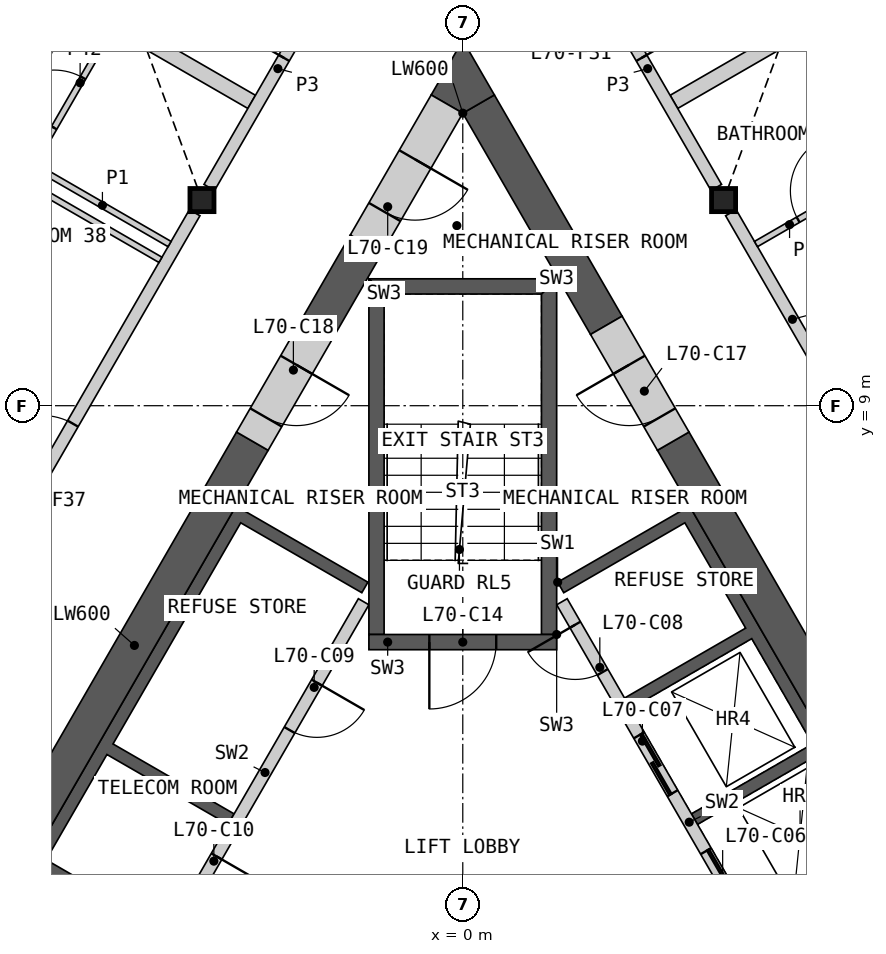
"""IFC4 building model, lengths in metres.
Left out: names, types, materials, properties, quantities, classifications, styles, units other than length and angle.
Written with IfcOpenShell. Run it as: python <this file> out.ifc"""

import sys

from ifc_helpers import new_model, si_unit, direction, frame, frame_2d, origin, origin_2d, place, context, subcontext, project, spatial, polyline, rectangle, i_section, outline, extrude, element, fill, save


model = new_model("IFC4")
c1 = context("Model", 3, precision=1e-05, world=origin(), true_north=direction((0.0, 1.0)))
c2 = subcontext(c1, "Body", "Model", "MODEL_VIEW")
j1 = project(units=[si_unit("LENGTHUNIT", "METRE"), si_unit("PLANEANGLEUNIT", "RADIAN")], contexts=[c1])
p1 = place(None, origin())
s1 = spatial("IfcSite", under=j1, at=p1, CompositionType="ELEMENT")
p2 = place(p1, origin())
s2 = spatial("IfcBuilding", under=s1, at=p2, CompositionType="ELEMENT")
p3 = place(p2, frame((0.0, 0.0, 318.8)))
s3 = spatial("IfcBuildingStorey", under=s2, at=p3, CompositionType="ELEMENT", Elevation=318.8)
for number, where, z_axis, x_axis in (
    (1, (-4.289, 12.382, 0.0), (0.0, 0.0, 1.0), (1.0, 0.0, 0.0)),
    (2, (4.289, 12.382, 0.0), (0.0, 0.0, 1.0), (1.0, 0.0, 0.0)),
):
    element("IfcColumn", number, at=place(p3, frame(where, z_axis=z_axis, x_axis=x_axis)), inside=s3, PredefinedType="COLUMN", context=c2, shape_type="SweptSolid", body=[
        extrude(i_section(OverallWidth=0.396, OverallDepth=0.381, WebThickness=0.019, FlangeThickness=0.03, at=origin_2d()), origin(), (0.0, 0.0, 1.0), 3.4),
    ])
p4 = place(p3, origin())
e3 = element("IfcWall", 3, at=p4, inside=s3, PredefinedType="SHEAR", context=c2, shape_type="SweptSolid", body=[
    extrude(outline(polyline([(1.561, 6.097), (3.731, 7.35), (8.231, -0.444), (6.061, -1.697), (5.96, -1.524), (7.952, -0.374), (6.952, 1.358), (4.96, 0.208), (4.861, 0.381), (6.852, 1.531), (5.852, 3.263), (3.861, 2.113), (3.76, 2.287), (5.752, 3.437), (4.752, 5.169), (2.76, 4.019), (2.66, 4.192), (4.652, 5.342), (3.652, 7.074), (1.66, 5.924), (1.561, 6.097)])), origin(), (0.0, 0.0, 1.0), 3.1),
])
p5 = place(p3, frame((5.817, -1.476, 0.0), z_axis=(0.0, 0.0, 1.0), x_axis=(-0.500002616675, 0.866023893041, 0.0)))
e4 = element("IfcWall", 4, at=p5, inside=s3, PredefinedType="SOLIDWALL", context=c2, shape_type="SweptSolid", body=[
    extrude(rectangle(XDim=8.373, YDim=0.2, at=frame_2d((4.187, 0.0))), origin(), (0.0, 0.0, 1.0), 3.1),
])
p6 = place(p5, frame((0.337, 0.0, 0.0)))
e5 = element("IfcOpeningElement", 5, at=p6, cuts=e4, PredefinedType="OPENING", context=c2, shape_type="SweptSolid", body=[
    extrude(rectangle(XDim=1.1, YDim=2.1, at=frame_2d((0.55, 1.05))), frame((0.0, 0.11, 0.0), z_axis=(0.0, -1.0, 0.0), x_axis=(1.0, 0.0, 0.0)), (0.0, 0.0, 1.0), 0.22),
])
p7 = place(p5, frame((2.537, 0.0, 0.0)))
e6 = element("IfcOpeningElement", 6, at=p7, cuts=e4, PredefinedType="OPENING", context=c2, shape_type="SweptSolid", body=[
    extrude(rectangle(XDim=1.1, YDim=2.1, at=frame_2d((0.55, 1.05))), frame((0.0, 0.11, 0.0), z_axis=(0.0, -1.0, 0.0), x_axis=(1.0, 0.0, 0.0)), (0.0, 0.0, 1.0), 0.22),
])
p8 = place(p5, frame((4.737, 0.0, 0.0)))
e7 = element("IfcOpeningElement", 7, at=p8, cuts=e4, PredefinedType="OPENING", context=c2, shape_type="SweptSolid", body=[
    extrude(rectangle(XDim=1.1, YDim=2.1, at=frame_2d((0.55, 1.05))), frame((0.0, 0.11, 0.0), z_axis=(0.0, -1.0, 0.0), x_axis=(1.0, 0.0, 0.0)), (0.0, 0.0, 1.0), 0.22),
])
p9 = place(p5, frame((7.037, 0.0, 0.0)))
e8 = element("IfcOpeningElement", 8, at=p9, cuts=e4, PredefinedType="OPENING", context=c2, shape_type="SweptSolid", body=[
    extrude(rectangle(XDim=0.9, YDim=2.1, at=frame_2d((0.45, 1.05))), frame((0.0, 0.11, 0.0), z_axis=(0.0, -1.0, 0.0), x_axis=(1.0, 0.0, 0.0)), (0.0, 0.0, 1.0), 0.22),
])
p10 = place(p3, origin())
e9 = element("IfcWall", 9, at=p10, inside=s3, PredefinedType="SHEAR", context=c2, shape_type="SweptSolid", body=[
    extrude(outline(polyline([(-4.96, 0.208), (-7.131, 1.461), (-3.731, 7.35), (-1.561, 6.097), (-1.66, 5.924), (-3.652, 7.074), (-5.752, 3.437), (-3.76, 2.287), (-3.861, 2.113), (-5.852, 3.263), (-6.852, 1.531), (-4.861, 0.381), (-4.96, 0.208)])), origin(), (0.0, 0.0, 1.0), 3.1),
])
p11 = place(p3, frame((-1.631, 5.776, 0.0), z_axis=(0.0, 0.0, 1.0), x_axis=(-0.499992876559, -0.866029516466, 0.0)))
e10 = element("IfcWall", 10, at=p11, inside=s3, PredefinedType="SOLIDWALL", context=c2, shape_type="SweptSolid", body=[
    extrude(rectangle(XDim=6.486, YDim=0.2, at=frame_2d((3.243, 0.0))), origin(), (0.0, 0.0, 1.0), 3.1),
])
p12 = place(p11, frame((1.537, 0.0, 0.0)))
e11 = element("IfcOpeningElement", 11, at=p12, cuts=e10, PredefinedType="OPENING", context=c2, shape_type="SweptSolid", body=[
    extrude(rectangle(XDim=0.9, YDim=2.1, at=frame_2d((0.45, 1.05))), frame((0.0, 0.11, 0.0), z_axis=(0.0, -1.0, 0.0), x_axis=(1.0, 0.0, 0.0)), (0.0, 0.0, 1.0), 0.22),
])
p13 = place(p11, frame((4.837, 0.0, 0.0)))
e12 = element("IfcOpeningElement", 12, at=p13, cuts=e10, PredefinedType="OPENING", context=c2, shape_type="SweptSolid", body=[
    extrude(rectangle(XDim=0.9, YDim=2.1, at=frame_2d((0.45, 1.05))), frame((0.0, 0.11, 0.0), z_axis=(0.0, -1.0, 0.0), x_axis=(1.0, 0.0, 0.0)), (0.0, 0.0, 1.0), 0.22),
])
p14 = place(p3, origin())
e13 = element("IfcWall", 13, at=p14, inside=s3, PredefinedType="SHEAR", context=c2, shape_type="SweptSolid", body=[
    extrude(outline(polyline([(1.544, 5.237), (1.544, 11.087), (1.294, 10.837), (1.294, 5.237), (1.544, 5.237)])), origin(), (0.0, 0.0, 1.0), 3.1),
])
p15 = place(p3, origin())
e14 = element("IfcWall", 14, at=p15, inside=s3, PredefinedType="SHEAR", context=c2, shape_type="SweptSolid", body=[
    extrude(outline(polyline([(1.544, 11.087), (-1.544, 11.087), (-1.294, 10.837), (1.294, 10.837), (1.544, 11.087)])), origin(), (0.0, 0.0, 1.0), 3.1),
])
p16 = place(p3, origin())
e15 = element("IfcWall", 15, at=p16, inside=s3, PredefinedType="SHEAR", context=c2, shape_type="SweptSolid", body=[
    extrude(outline(polyline([(-1.294, 10.837), (-1.544, 11.087), (-1.544, 5.237), (-1.294, 5.237), (-1.294, 10.837)])), origin(), (0.0, 0.0, 1.0), 3.1),
])
p17 = place(p3, frame((1.544, 5.112, 0.0), z_axis=(0.0, 0.0, 1.0), x_axis=(-1.0, 0.0, 0.0)))
e16 = element("IfcWall", 16, at=p17, inside=s3, PredefinedType="SHEAR", context=c2, shape_type="SweptSolid", body=[
    extrude(rectangle(XDim=3.088, YDim=0.25, at=frame_2d((1.544, 0.0))), origin(), (0.0, 0.0, 1.0), 3.1),
])
p18 = place(p17, frame((0.994, 0.0, 0.0)))
e17 = element("IfcOpeningElement", 17, at=p18, cuts=e16, PredefinedType="OPENING", context=c2, shape_type="SweptSolid", body=[
    extrude(rectangle(XDim=1.1, YDim=2.1, at=frame_2d((0.55, 1.05))), frame((0.0, 0.135, 0.0), z_axis=(0.0, -1.0, 0.0), x_axis=(1.0, 0.0, 0.0)), (0.0, 0.0, 1.0), 0.27),
])
p19 = place(p3, frame((8.686, -0.634, 0.0), z_axis=(0.0, 0.0, 1.0), x_axis=(-0.50001836461, 0.866014800712, 0.0)))
e18 = element("IfcWall", 18, at=p19, inside=s3, PredefinedType="SHEAR", context=c2, shape_type="SweptSolid", body=[
    extrude(rectangle(XDim=10.451, YDim=0.6, at=frame_2d((5.225, 0.0))), origin(), (0.0, 0.0, 1.0), 3.1),
])
p20 = place(p3, frame((2.361, 10.322, 0.0), z_axis=(0.0, 0.0, 1.0), x_axis=(-0.500000735859, 0.866024978935, 0.0)))
e19 = element("IfcWall", 19, at=p20, inside=s3, PredefinedType="SHEAR", context=c2, shape_type="SweptSolid", body=[
    extrude(rectangle(XDim=4.202, YDim=0.6, at=frame_2d((2.101, 0.0))), origin(), (0.0, 0.0, 1.0), 3.1),
])
p21 = place(p3, frame((-3.461, 8.417, 0.0), z_axis=(0.0, 0.0, 1.0), x_axis=(-0.50000391502, -0.866023143435, 0.0)))
e20 = element("IfcWall", 20, at=p21, inside=s3, PredefinedType="SHEAR", context=c2, shape_type="SweptSolid", body=[
    extrude(rectangle(XDim=7.759, YDim=0.6, at=frame_2d((3.879, 0.0))), origin(), (0.0, 0.0, 1.0), 3.1),
])
p22 = place(p3, frame((-1.59, 11.658, 0.0), z_axis=(0.0, 0.0, 1.0), x_axis=(-0.500037594623, -0.866003697431, 0.0)))
e21 = element("IfcWall", 21, at=p22, inside=s3, PredefinedType="SHEAR", context=c2, shape_type="SweptSolid", body=[
    extrude(rectangle(XDim=1.542, YDim=0.6, at=frame_2d((0.771, 0.0))), origin(), (0.0, 0.0, 1.0), 3.1),
])
p23 = place(p3, origin())
e22 = element("IfcWall", 22, at=p23, inside=s3, PredefinedType="SHEAR", context=c2, shape_type="SweptSolid", body=[
    extrude(outline(polyline([(0.0, 13.811), (-0.52, 14.111), (0.0, 15.011), (0.52, 14.111), (0.0, 13.811)])), origin(), (0.0, 0.0, 1.0), 3.1),
])
p24 = place(p3, frame((3.461, 8.417, 0.0), z_axis=(0.0, 0.0, 1.0), x_axis=(-0.499946605688, 0.86605622881, 0.0)))
e23 = element("IfcWall", 23, at=p24, inside=s3, PredefinedType="SHEAR", context=c2, shape_type="SweptSolid", body=[
    extrude(rectangle(XDim=2.2, YDim=0.6, at=frame_2d((1.1, 0.0))), origin(), (0.0, 0.0, 1.0), 3.1),
])
p25 = place(p24, frame((0.45, 0.0, 0.0)))
e24 = element("IfcOpeningElement", 24, at=p25, cuts=e23, PredefinedType="OPENING", context=c2, shape_type="SweptSolid", body=[
    extrude(rectangle(XDim=1.0, YDim=2.1, at=frame_2d((0.5, 1.05))), frame((0.0, 0.31, 0.0), z_axis=(0.0, -1.0, 0.0), x_axis=(1.0, 0.0, 0.0)), (0.0, 0.0, 1.0), 0.62),
])
p26 = place(p3, frame((-2.361, 10.322, 0.0), z_axis=(0.0, 0.0, 1.0), x_axis=(-0.499946605688, -0.86605622881, 0.0)))
e25 = element("IfcWall", 25, at=p26, inside=s3, PredefinedType="SHEAR", context=c2, shape_type="SweptSolid", body=[
    extrude(rectangle(XDim=2.2, YDim=0.6, at=frame_2d((1.1, 0.0))), origin(), (0.0, 0.0, 1.0), 3.1),
])
p27 = place(p26, frame((0.75, 0.0, 0.0)))
e26 = element("IfcOpeningElement", 26, at=p27, cuts=e25, PredefinedType="OPENING", context=c2, shape_type="SweptSolid", body=[
    extrude(rectangle(XDim=1.0, YDim=2.1, at=frame_2d((0.5, 1.05))), frame((0.0, 0.31, 0.0), z_axis=(0.0, -1.0, 0.0), x_axis=(1.0, 0.0, 0.0)), (0.0, 0.0, 1.0), 0.62),
])
p28 = place(p3, frame((-0.26, 13.961, 0.0), z_axis=(0.0, 0.0, 1.0), x_axis=(-0.49997936161, -0.866037319036, 0.0)))
e27 = element("IfcWall", 27, at=p28, inside=s3, PredefinedType="SHEAR", context=c2, shape_type="SweptSolid", body=[
    extrude(rectangle(XDim=2.66, YDim=0.6, at=frame_2d((1.33, 0.0))), origin(), (0.0, 0.0, 1.0), 3.1),
])
p29 = place(p28, frame((1.05, 0.0, 0.0)))
e28 = element("IfcOpeningElement", 28, at=p29, cuts=e27, PredefinedType="OPENING", context=c2, shape_type="SweptSolid", body=[
    extrude(rectangle(XDim=1.0, YDim=2.1, at=frame_2d((0.5, 1.05))), frame((0.0, 0.31, 0.0), z_axis=(0.0, -1.0, 0.0), x_axis=(1.0, 0.0, 0.0)), (0.0, 0.0, 1.0), 0.62),
])
p30 = place(p3, frame((3.472, 13.997, 0.0), z_axis=(0.0, 0.0, 1.0), x_axis=(0.866029233976, 0.499993365855, 0.0)))
e29 = element("IfcWall", 29, at=p30, inside=s3, PredefinedType="PARTITIONING", context=c2, shape_type="SweptSolid", body=[
    extrude(rectangle(XDim=12.637, YDim=0.25, at=frame_2d((6.319, 0.0))), origin(), (0.0, 0.0, 1.0), 2.33),
])
p31 = place(p3, frame((-8.458, 5.16, 0.0), z_axis=(0.0, 0.0, 1.0), x_axis=(0.499984266882, 0.866034487114, 0.0)))
e30 = element("IfcWall", 30, at=p31, inside=s3, PredefinedType="PARTITIONING", context=c2, shape_type="SweptSolid", body=[
    extrude(rectangle(XDim=8.099, YDim=0.2, at=frame_2d((4.049, 0.0))), origin(), (0.0, 0.0, 1.0), 3.1),
])
p32 = place(p31, frame((3.093, 0.0, 0.0)))
e31 = element("IfcOpeningElement", 31, at=p32, cuts=e30, PredefinedType="OPENING", context=c2, shape_type="SweptSolid", body=[
    extrude(rectangle(XDim=1.0, YDim=2.1, at=frame_2d((0.5, 1.05))), frame((0.0, 0.11, 0.0), z_axis=(0.0, -1.0, 0.0), x_axis=(1.0, 0.0, 0.0)), (0.0, 0.0, 1.0), 0.22),
])
p33 = place(p3, frame((4.409, 12.174, 0.0), z_axis=(0.0, 0.0, 1.0), x_axis=(0.499984266882, -0.866034487114, 0.0)))
e32 = element("IfcWall", 32, at=p33, inside=s3, PredefinedType="PARTITIONING", context=c2, shape_type="SweptSolid", body=[
    extrude(rectangle(XDim=8.099, YDim=0.2, at=frame_2d((4.049, 0.0))), origin(), (0.0, 0.0, 1.0), 3.1),
])
p34 = place(p33, frame((3.905, 0.0, 0.0)))
e33 = element("IfcOpeningElement", 33, at=p34, cuts=e32, PredefinedType="OPENING", context=c2, shape_type="SweptSolid", body=[
    extrude(rectangle(XDim=1.0, YDim=2.1, at=frame_2d((0.5, 1.05))), frame((0.0, 0.11, 0.0), z_axis=(0.0, -1.0, 0.0), x_axis=(1.0, 0.0, 0.0)), (0.0, 0.0, 1.0), 0.22),
])
p35 = place(p3, frame((-8.257, 16.76, 0.0), z_axis=(0.0, 0.0, 1.0), x_axis=(0.866034739526, -0.499983829672, 0.0)))
e34 = element("IfcWall", 34, at=p35, inside=s3, PredefinedType="PARTITIONING", context=c2, shape_type="SweptSolid", body=[
    extrude(rectangle(XDim=5.525, YDim=0.25, at=frame_2d((2.763, 0.0))), origin(), (0.0, 0.0, 1.0), 2.33),
])
p36 = place(p3, frame((1.913, 16.498, 0.0), z_axis=(0.0, 0.0, 1.0), x_axis=(0.499950370306, -0.866054055606, 0.0)))
e35 = element("IfcWall", 35, at=p36, inside=s3, PredefinedType="PARTITIONING", context=c2, shape_type="SweptSolid", body=[
    extrude(rectangle(XDim=4.513, YDim=0.2, at=frame_2d((2.256, 0.0))), origin(), (0.0, 0.0, 1.0), 3.1),
])
p37 = place(p36, frame((1.053, 0.0, 0.0)))
e36 = element("IfcOpeningElement", 36, at=p37, cuts=e35, PredefinedType="OPENING", context=c2, shape_type="SweptSolid", body=[
    extrude(rectangle(XDim=1.0, YDim=2.1, at=frame_2d((0.5, 1.05))), frame((0.0, 0.11, 0.0), z_axis=(0.0, -1.0, 0.0), x_axis=(1.0, 0.0, 0.0)), (0.0, 0.0, 1.0), 0.22),
])
p38 = place(p3, frame((-4.169, 12.59, 0.0), z_axis=(0.0, 0.0, 1.0), x_axis=(0.499950370306, 0.866054055606, 0.0)))
e37 = element("IfcWall", 37, at=p38, inside=s3, PredefinedType="PARTITIONING", context=c2, shape_type="SweptSolid", body=[
    extrude(rectangle(XDim=4.513, YDim=0.2, at=frame_2d((2.256, 0.0))), origin(), (0.0, 0.0, 1.0), 3.1),
])
p39 = place(p38, frame((2.459, 0.0, 0.0)))
e38 = element("IfcOpeningElement", 38, at=p39, cuts=e37, PredefinedType="OPENING", context=c2, shape_type="SweptSolid", body=[
    extrude(rectangle(XDim=1.0, YDim=2.1, at=frame_2d((0.5, 1.05))), frame((0.0, 0.11, 0.0), z_axis=(0.0, -1.0, 0.0), x_axis=(1.0, 0.0, 0.0)), (0.0, 0.0, 1.0), 0.22),
])
p40 = place(p3, frame((-9.783, 14.177, 0.0), z_axis=(0.0, 0.0, 1.0), x_axis=(0.866030435321, -0.499991285022, 0.0)))
e39 = element("IfcWall", 39, at=p40, inside=s3, PredefinedType="PARTITIONING", context=c2, shape_type="SweptSolid", body=[
    extrude(rectangle(XDim=5.555, YDim=0.1, at=frame_2d((2.778, 0.0))), origin(), (0.0, 0.0, 1.0), 2.33),
])
p41 = place(p40, frame((1.852, 0.0, 0.0)))
e40 = element("IfcOpeningElement", 40, at=p41, cuts=e39, PredefinedType="OPENING", context=c2, shape_type="SweptSolid", body=[
    extrude(rectangle(XDim=0.95, YDim=2.1, at=frame_2d((0.475, 1.05))), frame((0.0, 0.06, 0.0), z_axis=(0.0, -1.0, 0.0), x_axis=(1.0, 0.0, 0.0)), (0.0, 0.0, 1.0), 0.12),
])
p42 = place(p3, frame((4.349, 17.679, 0.0), z_axis=(0.0, 0.0, 1.0), x_axis=(0.49997732567, -0.866038494419, 0.0)))
e41 = element("IfcWall", 41, at=p42, inside=s3, PredefinedType="PARTITIONING", context=c2, shape_type="SweptSolid", body=[
    extrude(rectangle(XDim=5.5, YDim=0.1, at=frame_2d((2.75, 0.0))), origin(), (0.0, 0.0, 1.0), 2.33),
])
p43 = place(p3, frame((-7.099, 12.915, 0.0), z_axis=(0.0, 0.0, 1.0), x_axis=(0.49997732567, 0.866038494419, 0.0)))
e42 = element("IfcWall", 42, at=p43, inside=s3, PredefinedType="PARTITIONING", context=c2, shape_type="SweptSolid", body=[
    extrude(rectangle(XDim=5.5, YDim=0.1, at=frame_2d((2.75, 0.0))), origin(), (0.0, 0.0, 1.0), 2.33),
])
p44 = place(p43, frame((0.756, 0.0, 0.0)))
e43 = element("IfcOpeningElement", 43, at=p44, cuts=e42, PredefinedType="OPENING", context=c2, shape_type="SweptSolid", body=[
    extrude(rectangle(XDim=0.95, YDim=2.1, at=frame_2d((0.475, 1.05))), frame((0.0, 0.06, 0.0), z_axis=(0.0, -1.0, 0.0), x_axis=(1.0, 0.0, 0.0)), (0.0, 0.0, 1.0), 0.12),
])
p45 = place(p3, frame((4.822, 11.659, 0.0), z_axis=(0.0, 0.0, 1.0), x_axis=(0.866030925526, 0.499990435942, 0.0)))
e44 = element("IfcWall", 44, at=p45, inside=s3, PredefinedType="PARTITIONING", context=c2, shape_type="SweptSolid", body=[
    extrude(rectangle(XDim=2.55, YDim=0.1, at=frame_2d((1.275, 0.0))), origin(), (0.0, 0.0, 1.0), 2.33),
])
p46 = place(p45, frame((0.8, 0.0, 0.0)))
e45 = element("IfcOpeningElement", 45, at=p46, cuts=e44, PredefinedType="OPENING", context=c2, shape_type="SweptSolid", body=[
    extrude(rectangle(XDim=0.95, YDim=2.1, at=frame_2d((0.475, 1.05))), frame((0.0, 0.06, 0.0), z_axis=(0.0, -1.0, 0.0), x_axis=(1.0, 0.0, 0.0)), (0.0, 0.0, 1.0), 0.12),
])
p47 = place(p3, frame((-7.031, 12.934, 0.0), z_axis=(0.0, 0.0, 1.0), x_axis=(0.866030925526, -0.499990435942, 0.0)))
e46 = element("IfcWall", 46, at=p47, inside=s3, PredefinedType="PARTITIONING", context=c2, shape_type="SweptSolid", body=[
    extrude(rectangle(XDim=2.55, YDim=0.1, at=frame_2d((1.275, 0.0))), origin(), (0.0, 0.0, 1.0), 2.33),
])
p48 = place(p7, origin())
e47 = element("IfcDoor", 47, at=p48, inside=s3, OperationType="SLIDING_TO_LEFT", PredefinedType="DOOR", context=c2, shape_type="SweptSolid", body=[
    extrude(rectangle(XDim=1.1, YDim=2.1, at=frame_2d((0.55, 1.05))), frame((0.0, 0.025, 0.0), z_axis=(0.0, -1.0, 0.0), x_axis=(1.0, 0.0, 0.0)), (0.0, 0.0, 1.0), 0.05),
])
fill(e6, e47)
p49 = place(p8, origin())
e48 = element("IfcDoor", 48, at=p49, inside=s3, OperationType="SLIDING_TO_LEFT", PredefinedType="DOOR", context=c2, shape_type="SweptSolid", body=[
    extrude(rectangle(XDim=1.1, YDim=2.1, at=frame_2d((0.55, 1.05))), frame((0.0, 0.025, 0.0), z_axis=(0.0, -1.0, 0.0), x_axis=(1.0, 0.0, 0.0)), (0.0, 0.0, 1.0), 0.05),
])
fill(e7, e48)
p50 = place(p9, origin())
e49 = element("IfcDoor", 49, at=p50, inside=s3, OperationType="SINGLE_SWING_RIGHT", PredefinedType="DOOR", context=c2, shape_type="SweptSolid", body=[
    extrude(rectangle(XDim=0.9, YDim=2.1, at=frame_2d((0.45, 1.05))), frame((0.0, 0.025, 0.0), z_axis=(0.0, -1.0, 0.0), x_axis=(1.0, 0.0, 0.0)), (0.0, 0.0, 1.0), 0.05),
])
fill(e8, e49)
p51 = place(p12, origin())
e50 = element("IfcDoor", 50, at=p51, inside=s3, OperationType="SINGLE_SWING_LEFT", PredefinedType="DOOR", context=c2, shape_type="SweptSolid", body=[
    extrude(rectangle(XDim=0.9, YDim=2.1, at=frame_2d((0.45, 1.05))), frame((0.0, 0.025, 0.0), z_axis=(0.0, -1.0, 0.0), x_axis=(1.0, 0.0, 0.0)), (0.0, 0.0, 1.0), 0.05),
])
fill(e11, e50)
p52 = place(p13, origin())
e51 = element("IfcDoor", 51, at=p52, inside=s3, OperationType="SINGLE_SWING_LEFT", PredefinedType="DOOR", context=c2, shape_type="SweptSolid", body=[
    extrude(rectangle(XDim=0.9, YDim=2.1, at=frame_2d((0.45, 1.05))), frame((0.0, 0.025, 0.0), z_axis=(0.0, -1.0, 0.0), x_axis=(1.0, 0.0, 0.0)), (0.0, 0.0, 1.0), 0.05),
])
fill(e12, e51)
p53 = place(p18, origin())
e52 = element("IfcDoor", 52, at=p53, inside=s3, OperationType="SINGLE_SWING_RIGHT", PredefinedType="DOOR", context=c2, shape_type="SweptSolid", body=[
    extrude(rectangle(XDim=1.1, YDim=2.1, at=frame_2d((0.55, 1.05))), frame((0.0, 0.025, 0.0), z_axis=(0.0, -1.0, 0.0), x_axis=(1.0, 0.0, 0.0)), (0.0, 0.0, 1.0), 0.05),
])
fill(e17, e52)
p54 = place(p25, origin())
e53 = element("IfcDoor", 53, at=p54, inside=s3, OperationType="SINGLE_SWING_RIGHT", PredefinedType="DOOR", context=c2, shape_type="SweptSolid", body=[
    extrude(rectangle(XDim=1.0, YDim=2.1, at=frame_2d((0.5, 1.05))), frame((0.0, 0.055, 0.0), z_axis=(0.0, -1.0, 0.0), x_axis=(1.0, 0.0, 0.0)), (0.0, 0.0, 1.0), 0.05),
])
fill(e24, e53)
p55 = place(p27, origin())
e54 = element("IfcDoor", 54, at=p55, inside=s3, OperationType="SINGLE_SWING_LEFT", PredefinedType="DOOR", context=c2, shape_type="SweptSolid", body=[
    extrude(rectangle(XDim=1.0, YDim=2.1, at=frame_2d((0.5, 1.05))), frame((0.0, 0.055, 0.0), z_axis=(0.0, -1.0, 0.0), x_axis=(1.0, 0.0, 0.0)), (0.0, 0.0, 1.0), 0.05),
])
fill(e26, e54)
p56 = place(p29, origin())
e55 = element("IfcDoor", 55, at=p56, inside=s3, OperationType="SINGLE_SWING_LEFT", PredefinedType="DOOR", context=c2, shape_type="SweptSolid", body=[
    extrude(rectangle(XDim=1.0, YDim=2.1, at=frame_2d((0.5, 1.05))), frame((0.0, 0.055, 0.0), z_axis=(0.0, -1.0, 0.0), x_axis=(1.0, 0.0, 0.0)), (0.0, 0.0, 1.0), 0.05),
])
fill(e28, e55)
p57 = place(p46, origin())
e56 = element("IfcDoor", 56, at=p57, inside=s3, OperationType="SINGLE_SWING_RIGHT", PredefinedType="DOOR", context=c2, shape_type="SweptSolid", body=[
    extrude(rectangle(XDim=0.95, YDim=2.1, at=frame_2d((0.475, 1.05))), frame((0.0, 0.025, 0.0), z_axis=(0.0, -1.0, 0.0), x_axis=(1.0, 0.0, 0.0)), (0.0, 0.0, 1.0), 0.05),
])
fill(e45, e56)
p58 = place(p37, origin())
e57 = element("IfcDoor", 57, at=p58, inside=s3, OperationType="SINGLE_SWING_RIGHT", PredefinedType="DOOR", context=c2, shape_type="SweptSolid", body=[
    extrude(rectangle(XDim=1.0, YDim=2.1, at=frame_2d((0.5, 1.05))), frame((0.0, 0.025, 0.0), z_axis=(0.0, -1.0, 0.0), x_axis=(1.0, 0.0, 0.0)), (0.0, 0.0, 1.0), 0.05),
])
fill(e36, e57)
p59 = place(p39, origin())
e58 = element("IfcDoor", 58, at=p59, inside=s3, OperationType="SINGLE_SWING_LEFT", PredefinedType="DOOR", context=c2, shape_type="SweptSolid", body=[
    extrude(rectangle(XDim=1.0, YDim=2.1, at=frame_2d((0.5, 1.05))), frame((0.0, 0.025, 0.0), z_axis=(0.0, -1.0, 0.0), x_axis=(1.0, 0.0, 0.0)), (0.0, 0.0, 1.0), 0.05),
])
fill(e38, e58)
p60 = place(p32, origin())
e59 = element("IfcDoor", 59, at=p60, inside=s3, OperationType="SINGLE_SWING_LEFT", PredefinedType="DOOR", context=c2, shape_type="SweptSolid", body=[
    extrude(rectangle(XDim=1.0, YDim=2.1, at=frame_2d((0.5, 1.05))), frame((0.0, 0.025, 0.0), z_axis=(0.0, -1.0, 0.0), x_axis=(1.0, 0.0, 0.0)), (0.0, 0.0, 1.0), 0.05),
])
fill(e31, e59)
p61 = place(p44, origin())
e60 = element("IfcDoor", 60, at=p61, inside=s3, OperationType="SINGLE_SWING_LEFT", PredefinedType="DOOR", context=c2, shape_type="SweptSolid", body=[
    extrude(rectangle(XDim=0.95, YDim=2.1, at=frame_2d((0.475, 1.05))), frame((0.0, 0.025, 0.0), z_axis=(0.0, -1.0, 0.0), x_axis=(1.0, 0.0, 0.0)), (0.0, 0.0, 1.0), 0.05),
])
fill(e43, e60)
save(model, sys.argv[1])
